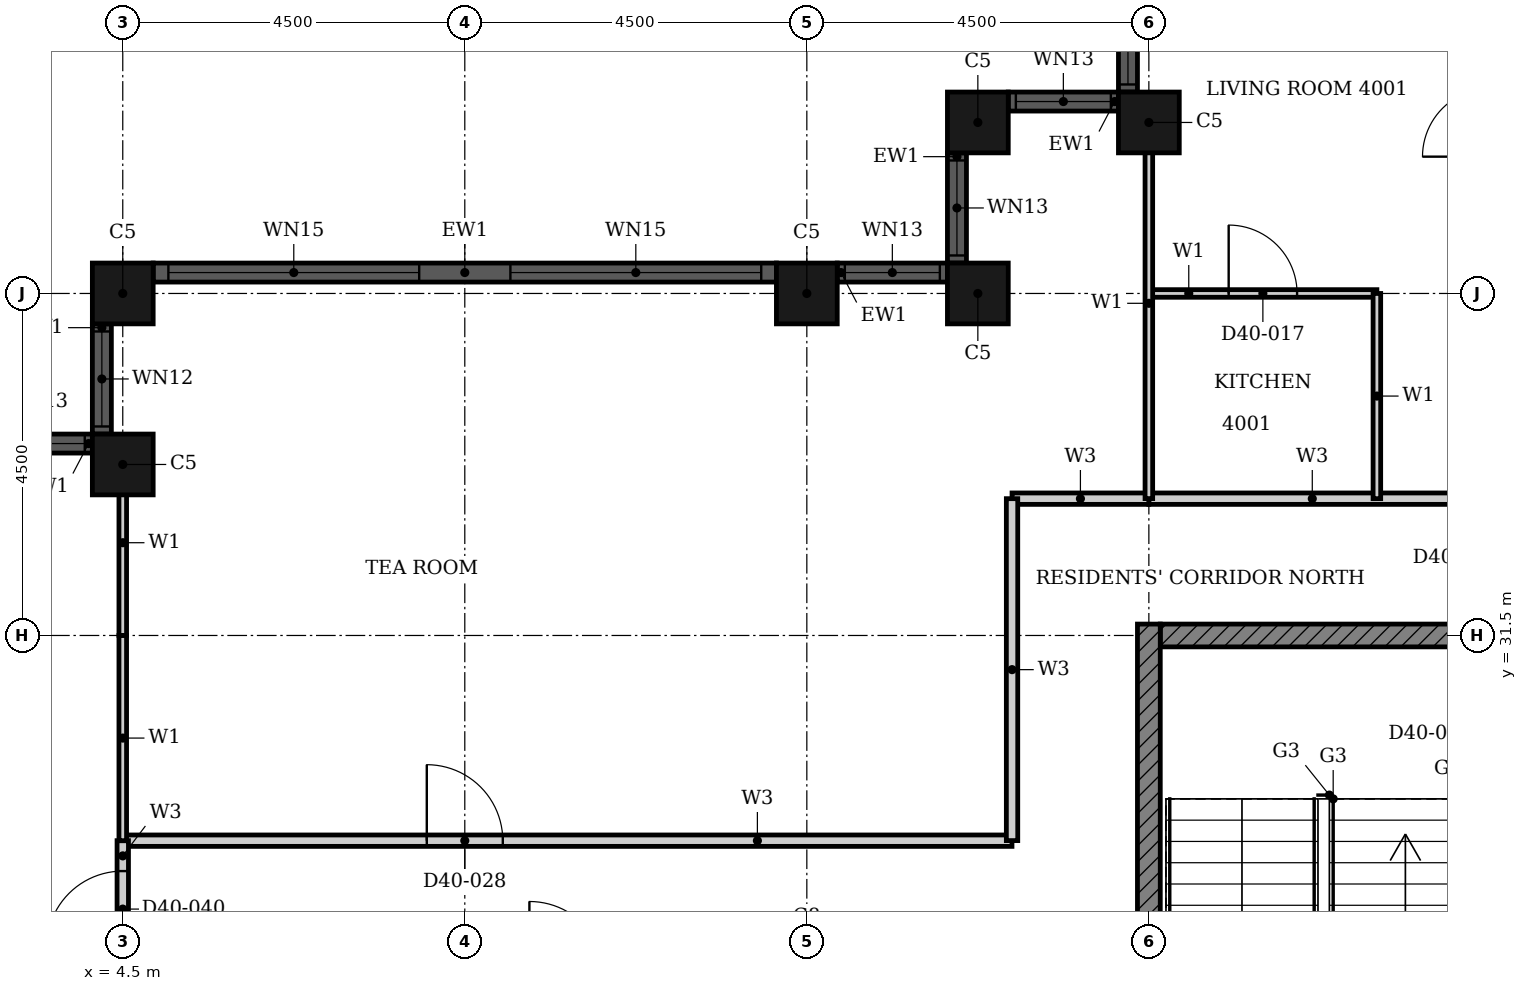
"""IFC4 building model, lengths in metres.
Left out: names, types, materials, properties, quantities, classifications, styles, units other than length and angle.
Written with IfcOpenShell. Run it as: python <this file> out.ifc"""

import sys

from ifc_helpers import new_model, si_unit, direction, frame, frame_2d, origin, origin_2d, place, context, subcontext, project, spatial, rectangle, hollow_rectangle, extrude, element, fill, save


model = new_model("IFC4")
c1 = context("Model", 3, precision=1e-05, world=origin(), true_north=direction((0.0, 1.0)))
c2 = subcontext(c1, "Body", "Model", "MODEL_VIEW")
j1 = project(units=[si_unit("LENGTHUNIT", "METRE"), si_unit("PLANEANGLEUNIT", "RADIAN")], contexts=[c1])
p1 = place(None, origin())
s1 = spatial("IfcSite", under=j1, at=p1, CompositionType="ELEMENT")
p2 = place(p1, origin())
s2 = spatial("IfcBuilding", under=s1, at=p2, CompositionType="ELEMENT")
p3 = place(p2, frame((0.0, 0.0, 161.7)))
s3 = spatial("IfcBuildingStorey", under=s2, at=p3, CompositionType="ELEMENT", Elevation=161.7)
for number, where, z_axis, x_axis in (
    (1, (18.0, 38.25, 0.0), (0.0, 0.0, 1.0), (1.0, 0.0, 0.0)),
    (2, (15.75, 38.25, 0.0), (0.0, 0.0, 1.0), (1.0, 0.0, 0.0)),
    (3, (15.75, 36.0, 0.0), (0.0, 0.0, 1.0), (1.0, 0.0, 0.0)),
    (4, (13.5, 36.0, 0.0), (0.0, 0.0, 1.0), (1.0, 0.0, 0.0)),
    (5, (4.5, 36.0, 0.0), (0.0, 0.0, 1.0), (1.0, 0.0, 0.0)),
    (6, (4.5, 33.75, 0.0), (0.0, 0.0, 1.0), (1.0, 0.0, 0.0)),
):
    element("IfcColumn", number, at=place(p3, frame(where, z_axis=z_axis, x_axis=x_axis)), inside=s3, PredefinedType="COLUMN", context=c2, shape_type="SweptSolid", body=[
        extrude(hollow_rectangle(XDim=0.8, YDim=0.8, WallThickness=0.025, at=origin_2d()), origin(), (0.0, 0.0, 1.0), 3.7),
    ])
p4 = place(p3, frame((17.725, 40.1, 0.0), z_axis=(0.0, 0.0, 1.0), x_axis=(0.0, -1.0, 0.0)))
e7 = element("IfcWall", 7, at=p4, inside=s3, PredefinedType="SOLIDWALL", context=c2, shape_type="SweptSolid", body=[
    extrude(rectangle(XDim=1.45, YDim=0.25, at=frame_2d((0.725, 0.0))), origin(), (0.0, 0.0, 1.0), 3.7),
])
p5 = place(p4, frame((0.1, 0.0, 0.9)))
e8 = element("IfcOpeningElement", 8, at=p5, cuts=e7, PredefinedType="OPENING", context=c2, shape_type="SweptSolid", body=[
    extrude(rectangle(XDim=1.25, YDim=1.85, at=frame_2d((0.625, 0.925))), frame((0.0, 0.135, 0.0), z_axis=(0.0, -1.0, 0.0), x_axis=(1.0, 0.0, 0.0)), (0.0, 0.0, 1.0), 0.27),
])
p6 = place(p3, frame((17.6, 38.525, 0.0), z_axis=(0.0, 0.0, 1.0), x_axis=(-1.0, 0.0, 0.0)))
e9 = element("IfcWall", 9, at=p6, inside=s3, PredefinedType="SOLIDWALL", context=c2, shape_type="SweptSolid", body=[
    extrude(rectangle(XDim=1.45, YDim=0.25, at=frame_2d((0.725, 0.0))), origin(), (0.0, 0.0, 1.0), 3.7),
])
p7 = place(p6, frame((0.1, 0.0, 0.9)))
e10 = element("IfcOpeningElement", 10, at=p7, cuts=e9, PredefinedType="OPENING", context=c2, shape_type="SweptSolid", body=[
    extrude(rectangle(XDim=1.25, YDim=1.85, at=frame_2d((0.625, 0.925))), frame((0.0, 0.135, 0.0), z_axis=(0.0, -1.0, 0.0), x_axis=(1.0, 0.0, 0.0)), (0.0, 0.0, 1.0), 0.27),
])
p8 = place(p3, frame((15.475, 37.85, 0.0), z_axis=(0.0, 0.0, 1.0), x_axis=(0.0, -1.0, 0.0)))
e11 = element("IfcWall", 11, at=p8, inside=s3, PredefinedType="SOLIDWALL", context=c2, shape_type="SweptSolid", body=[
    extrude(rectangle(XDim=1.45, YDim=0.25, at=frame_2d((0.725, 0.0))), origin(), (0.0, 0.0, 1.0), 3.7),
])
p9 = place(p8, frame((0.1, 0.0, 0.9)))
e12 = element("IfcOpeningElement", 12, at=p9, cuts=e11, PredefinedType="OPENING", context=c2, shape_type="SweptSolid", body=[
    extrude(rectangle(XDim=1.25, YDim=1.85, at=frame_2d((0.625, 0.925))), frame((0.0, 0.135, 0.0), z_axis=(0.0, -1.0, 0.0), x_axis=(1.0, 0.0, 0.0)), (0.0, 0.0, 1.0), 0.27),
])
p10 = place(p3, frame((15.35, 36.275, 0.0), z_axis=(0.0, 0.0, 1.0), x_axis=(-1.0, 0.0, 0.0)))
e13 = element("IfcWall", 13, at=p10, inside=s3, PredefinedType="SOLIDWALL", context=c2, shape_type="SweptSolid", body=[
    extrude(rectangle(XDim=1.45, YDim=0.25, at=frame_2d((0.725, 0.0))), origin(), (0.0, 0.0, 1.0), 3.7),
])
p11 = place(p10, frame((0.1, 0.0, 0.9)))
e14 = element("IfcOpeningElement", 14, at=p11, cuts=e13, PredefinedType="OPENING", context=c2, shape_type="SweptSolid", body=[
    extrude(rectangle(XDim=1.25, YDim=1.85, at=frame_2d((0.625, 0.925))), frame((0.0, 0.135, 0.0), z_axis=(0.0, -1.0, 0.0), x_axis=(1.0, 0.0, 0.0)), (0.0, 0.0, 1.0), 0.27),
])
p12 = place(p3, frame((13.1, 36.275, 0.0), z_axis=(0.0, 0.0, 1.0), x_axis=(-1.0, 0.0, 0.0)))
e15 = element("IfcWall", 15, at=p12, inside=s3, PredefinedType="SOLIDWALL", context=c2, shape_type="SweptSolid", body=[
    extrude(rectangle(XDim=8.2, YDim=0.25, at=frame_2d((4.1, 0.0))), origin(), (0.0, 0.0, 1.0), 3.7),
])
p13 = place(p12, frame((0.2, 0.0, 0.45)))
e16 = element("IfcOpeningElement", 16, at=p13, cuts=e15, PredefinedType="OPENING", context=c2, shape_type="SweptSolid", body=[
    extrude(rectangle(XDim=3.3, YDim=2.3, at=frame_2d((1.65, 1.15))), frame((0.0, 0.135, 0.0), z_axis=(0.0, -1.0, 0.0), x_axis=(1.0, 0.0, 0.0)), (0.0, 0.0, 1.0), 0.27),
])
p14 = place(p12, frame((4.7, 0.0, 0.45)))
e17 = element("IfcOpeningElement", 17, at=p14, cuts=e15, PredefinedType="OPENING", context=c2, shape_type="SweptSolid", body=[
    extrude(rectangle(XDim=3.3, YDim=2.3, at=frame_2d((1.65, 1.15))), frame((0.0, 0.135, 0.0), z_axis=(0.0, -1.0, 0.0), x_axis=(1.0, 0.0, 0.0)), (0.0, 0.0, 1.0), 0.27),
])
p15 = place(p3, frame((4.225, 35.6, 0.0), z_axis=(0.0, 0.0, 1.0), x_axis=(0.0, -1.0, 0.0)))
e18 = element("IfcWall", 18, at=p15, inside=s3, PredefinedType="SOLIDWALL", context=c2, shape_type="SweptSolid", body=[
    extrude(rectangle(XDim=1.45, YDim=0.25, at=frame_2d((0.725, 0.0))), origin(), (0.0, 0.0, 1.0), 3.7),
])
p16 = place(p15, frame((0.1, 0.0, 0.9)))
e19 = element("IfcOpeningElement", 19, at=p16, cuts=e18, PredefinedType="OPENING", context=c2, shape_type="SweptSolid", body=[
    extrude(rectangle(XDim=1.25, YDim=2.08, at=frame_2d((0.625, 1.04))), frame((0.0, 0.135, 0.0), z_axis=(0.0, -1.0, 0.0), x_axis=(1.0, 0.0, 0.0)), (0.0, 0.0, 1.0), 0.27),
])
p17 = place(p3, frame((4.1, 34.025, 0.0), z_axis=(0.0, 0.0, 1.0), x_axis=(-1.0, 0.0, 0.0)))
e20 = element("IfcWall", 20, at=p17, inside=s3, PredefinedType="SOLIDWALL", context=c2, shape_type="SweptSolid", body=[
    extrude(rectangle(XDim=1.45, YDim=0.25, at=frame_2d((0.725, 0.0))), origin(), (0.0, 0.0, 1.0), 3.7),
])
p18 = place(p17, frame((0.1, 0.0, 0.9)))
e21 = element("IfcOpeningElement", 21, at=p18, cuts=e20, PredefinedType="OPENING", context=c2, shape_type="SweptSolid", body=[
    extrude(rectangle(XDim=1.25, YDim=1.85, at=frame_2d((0.625, 0.925))), frame((0.0, 0.135, 0.0), z_axis=(0.0, -1.0, 0.0), x_axis=(1.0, 0.0, 0.0)), (0.0, 0.0, 1.0), 0.27),
])
p19 = place(p3, frame((18.15, 31.5, 0.0), z_axis=(0.0, 0.0, 1.0), x_axis=(1.0, 0.0, 0.0)))
e22 = element("IfcWall", 22, at=p19, inside=s3, PredefinedType="SHEAR", context=c2, shape_type="SweptSolid", body=[
    extrude(rectangle(XDim=9.368, YDim=0.3, at=frame_2d((4.684, 0.0))), origin(), (0.0, 0.0, 1.0), 3.4),
])
p20 = place(p19, frame((4.736, 0.0, 0.0)))
e23 = element("IfcOpeningElement", 23, at=p20, cuts=e22, PredefinedType="OPENING", context=c2, shape_type="SweptSolid", body=[
    extrude(rectangle(XDim=1.8, YDim=2.1, at=frame_2d((0.9, 1.05))), frame((0.0, 0.16, 0.0), z_axis=(0.0, -1.0, 0.0), x_axis=(1.0, 0.0, 0.0)), (0.0, 0.0, 1.0), 0.32),
])
p21 = place(p3, frame((18.0, 22.35, 0.0), z_axis=(0.0, 0.0, 1.0), x_axis=(0.0, 1.0, 0.0)))
e24 = element("IfcWall", 24, at=p21, inside=s3, PredefinedType="SHEAR", context=c2, shape_type="SweptSolid", body=[
    extrude(rectangle(XDim=9.3, YDim=0.3, at=frame_2d((4.65, 0.0))), origin(), (0.0, 0.0, 1.0), 3.4),
])
p22 = place(p3, frame((4.5, 28.8, 0.0), z_axis=(0.0, 0.0, 1.0), x_axis=(1.0, 0.0, 0.0)))
e25 = element("IfcWall", 25, at=p22, inside=s3, PredefinedType="PARTITIONING", context=c2, shape_type="SweptSolid", body=[
    extrude(rectangle(XDim=11.699, YDim=0.15, at=frame_2d((5.85, 0.0))), origin(), (0.0, 0.0, 1.0), 3.4),
])
p23 = place(p22, frame((4.0, 0.0, 0.0)))
e26 = element("IfcOpeningElement", 26, at=p23, cuts=e25, PredefinedType="OPENING", context=c2, shape_type="SweptSolid", body=[
    extrude(rectangle(XDim=1.0, YDim=2.1, at=frame_2d((0.5, 1.05))), frame((0.0, 0.085, 0.0), z_axis=(0.0, -1.0, 0.0), x_axis=(1.0, 0.0, 0.0)), (0.0, 0.0, 1.0), 0.17),
])
p24 = place(p3, frame((18.0, 33.3, 0.0), z_axis=(0.0, 0.0, 1.0), x_axis=(1.0, 0.0, 0.0)))
e27 = element("IfcWall", 27, at=p24, inside=s3, PredefinedType="PARTITIONING", context=c2, shape_type="SweptSolid", body=[
    extrude(rectangle(XDim=6.6, YDim=0.15, at=frame_2d((3.3, 0.0))), origin(), (0.0, 0.0, 1.0), 3.4),
])
p25 = place(p24, frame((4.3, 0.0, 0.0)))
e28 = element("IfcOpeningElement", 28, at=p25, cuts=e27, PredefinedType="OPENING", context=c2, shape_type="SweptSolid", body=[
    extrude(rectangle(XDim=1.0, YDim=2.2, at=frame_2d((0.5, 1.1))), frame((0.0, 0.085, 0.0), z_axis=(0.0, -1.0, 0.0), x_axis=(1.0, 0.0, 0.0)), (0.0, 0.0, 1.0), 0.17),
])
p26 = place(p3, frame((16.2, 33.3, 0.0), z_axis=(0.0, 0.0, 1.0), x_axis=(1.0, 0.0, 0.0)))
e29 = element("IfcWall", 29, at=p26, inside=s3, PredefinedType="PARTITIONING", context=c2, shape_type="SweptSolid", body=[
    extrude(rectangle(XDim=1.799, YDim=0.15, at=frame_2d((0.899, 0.0))), origin(), (0.0, 0.0, 1.0), 3.4),
])
p27 = place(p3, frame((16.2, 28.801, 0.0), z_axis=(0.0, 0.0, 1.0), x_axis=(0.0, 1.0, 0.0)))
e30 = element("IfcWall", 30, at=p27, inside=s3, PredefinedType="PARTITIONING", context=c2, shape_type="SweptSolid", body=[
    extrude(rectangle(XDim=4.499, YDim=0.15, at=frame_2d((2.25, 0.0))), origin(), (0.0, 0.0, 1.0), 3.4),
])
p28 = place(p3, frame((4.5, 27.0, 0.0), z_axis=(0.0, 0.0, 1.0), x_axis=(0.0, 1.0, 0.0)))
e31 = element("IfcWall", 31, at=p28, inside=s3, PredefinedType="PARTITIONING", context=c2, shape_type="SweptSolid", body=[
    extrude(rectangle(XDim=1.8, YDim=0.15, at=frame_2d((0.9, 0.0))), origin(), (0.0, 0.0, 1.0), 3.4),
])
p29 = place(p28, frame((0.4, 0.0, 0.0)))
e32 = element("IfcOpeningElement", 32, at=p29, cuts=e31, PredefinedType="OPENING", context=c2, shape_type="SweptSolid", body=[
    extrude(rectangle(XDim=1.0, YDim=2.2, at=frame_2d((0.5, 1.1))), frame((0.0, 0.085, 0.0), z_axis=(0.0, -1.0, 0.0), x_axis=(1.0, 0.0, 0.0)), (0.0, 0.0, 1.0), 0.17),
])
p30 = place(p3, frame((18.0, 36.0, 0.0), z_axis=(0.0, 0.0, 1.0), x_axis=(1.0, 0.0, 0.0)))
e33 = element("IfcWall", 33, at=p30, inside=s3, PredefinedType="PARTITIONING", context=c2, shape_type="SweptSolid", body=[
    extrude(rectangle(XDim=3.0, YDim=0.1, at=frame_2d((1.5, 0.0))), origin(), (0.0, 0.0, 1.0), 3.4),
])
p31 = place(p30, frame((1.05, 0.0, 0.0)))
e34 = element("IfcOpeningElement", 34, at=p31, cuts=e33, PredefinedType="OPENING", context=c2, shape_type="SweptSolid", body=[
    extrude(rectangle(XDim=0.9, YDim=2.1, at=frame_2d((0.45, 1.05))), frame((0.0, 0.06, 0.0), z_axis=(0.0, -1.0, 0.0), x_axis=(1.0, 0.0, 0.0)), (0.0, 0.0, 1.0), 0.12),
])
p32 = place(p3, frame((18.0, 33.301, 0.0), z_axis=(0.0, 0.0, 1.0), x_axis=(0.0, 1.0, 0.0)))
e35 = element("IfcWall", 35, at=p32, inside=s3, PredefinedType="PARTITIONING", context=c2, shape_type="SweptSolid", body=[
    extrude(rectangle(XDim=5.139, YDim=0.1, at=frame_2d((2.569, 0.0))), origin(), (0.0, 0.0, 1.0), 3.4),
])
for number, where, z_axis, x_axis in (
    (36, (21.0, 33.3, 0.0), (0.0, 0.0, 1.0), (0.0, 1.0, 0.0)),
    (37, (4.5, 28.8, 0.0), (0.0, 0.0, 1.0), (0.0, 1.0, 0.0)),
):
    element("IfcWall", number, at=place(p3, frame(where, z_axis=z_axis, x_axis=x_axis)), inside=s3, PredefinedType="PARTITIONING", context=c2, shape_type="SweptSolid", body=[
        extrude(rectangle(XDim=2.7, YDim=0.1, at=frame_2d((1.35, 0.0))), origin(), (0.0, 0.0, 1.0), 3.4),
    ])
p33 = place(p3, frame((4.5, 31.501, 0.0), z_axis=(0.0, 0.0, 1.0), x_axis=(0.0, 1.0, 0.0)))
e38 = element("IfcWall", 38, at=p33, inside=s3, PredefinedType="PARTITIONING", context=c2, shape_type="SweptSolid", body=[
    extrude(rectangle(XDim=2.439, YDim=0.1, at=frame_2d((1.219, 0.0))), origin(), (0.0, 0.0, 1.0), 3.4),
])
p34 = place(p5, origin())
e39 = element("IfcWindow", 39, at=p34, inside=s3, PartitioningType="SINGLE_PANEL", PredefinedType="WINDOW", context=c2, shape_type="SweptSolid", body=[
    extrude(rectangle(XDim=1.25, YDim=1.85, at=frame_2d((0.625, 0.925))), frame((0.0, 0.03, 0.0), z_axis=(0.0, -1.0, 0.0), x_axis=(1.0, 0.0, 0.0)), (0.0, 0.0, 1.0), 0.06),
])
fill(e8, e39)
p35 = place(p7, origin())
e40 = element("IfcWindow", 40, at=p35, inside=s3, PartitioningType="SINGLE_PANEL", PredefinedType="WINDOW", context=c2, shape_type="SweptSolid", body=[
    extrude(rectangle(XDim=1.25, YDim=1.85, at=frame_2d((0.625, 0.925))), frame((0.0, 0.03, 0.0), z_axis=(0.0, -1.0, 0.0), x_axis=(1.0, 0.0, 0.0)), (0.0, 0.0, 1.0), 0.06),
])
fill(e10, e40)
p36 = place(p9, origin())
e41 = element("IfcWindow", 41, at=p36, inside=s3, PartitioningType="SINGLE_PANEL", PredefinedType="WINDOW", context=c2, shape_type="SweptSolid", body=[
    extrude(rectangle(XDim=1.25, YDim=1.85, at=frame_2d((0.625, 0.925))), frame((0.0, 0.03, 0.0), z_axis=(0.0, -1.0, 0.0), x_axis=(1.0, 0.0, 0.0)), (0.0, 0.0, 1.0), 0.06),
])
fill(e12, e41)
p37 = place(p11, origin())
e42 = element("IfcWindow", 42, at=p37, inside=s3, PartitioningType="SINGLE_PANEL", PredefinedType="WINDOW", context=c2, shape_type="SweptSolid", body=[
    extrude(rectangle(XDim=1.25, YDim=1.85, at=frame_2d((0.625, 0.925))), frame((0.0, 0.03, 0.0), z_axis=(0.0, -1.0, 0.0), x_axis=(1.0, 0.0, 0.0)), (0.0, 0.0, 1.0), 0.06),
])
fill(e14, e42)
p38 = place(p13, origin())
e43 = element("IfcWindow", 43, at=p38, inside=s3, PartitioningType="SINGLE_PANEL", PredefinedType="WINDOW", context=c2, shape_type="SweptSolid", body=[
    extrude(rectangle(XDim=3.3, YDim=2.3, at=frame_2d((1.65, 1.15))), frame((0.0, 0.03, 0.0), z_axis=(0.0, -1.0, 0.0), x_axis=(1.0, 0.0, 0.0)), (0.0, 0.0, 1.0), 0.06),
])
fill(e16, e43)
p39 = place(p14, origin())
e44 = element("IfcWindow", 44, at=p39, inside=s3, PartitioningType="SINGLE_PANEL", PredefinedType="WINDOW", context=c2, shape_type="SweptSolid", body=[
    extrude(rectangle(XDim=3.3, YDim=2.3, at=frame_2d((1.65, 1.15))), frame((0.0, 0.03, 0.0), z_axis=(0.0, -1.0, 0.0), x_axis=(1.0, 0.0, 0.0)), (0.0, 0.0, 1.0), 0.06),
])
fill(e17, e44)
p40 = place(p16, origin())
e45 = element("IfcWindow", 45, at=p40, inside=s3, PartitioningType="SINGLE_PANEL", PredefinedType="WINDOW", context=c2, shape_type="SweptSolid", body=[
    extrude(rectangle(XDim=1.25, YDim=2.08, at=frame_2d((0.625, 1.04))), frame((0.0, 0.03, 0.0), z_axis=(0.0, -1.0, 0.0), x_axis=(1.0, 0.0, 0.0)), (0.0, 0.0, 1.0), 0.06),
])
fill(e19, e45)
p41 = place(p18, origin())
e46 = element("IfcWindow", 46, at=p41, inside=s3, PartitioningType="SINGLE_PANEL", PredefinedType="WINDOW", context=c2, shape_type="SweptSolid", body=[
    extrude(rectangle(XDim=1.25, YDim=1.85, at=frame_2d((0.625, 0.925))), frame((0.0, 0.03, 0.0), z_axis=(0.0, -1.0, 0.0), x_axis=(1.0, 0.0, 0.0)), (0.0, 0.0, 1.0), 0.06),
])
fill(e21, e46)
p42 = place(p31, origin())
e47 = element("IfcDoor", 47, at=p42, inside=s3, OperationType="SINGLE_SWING_LEFT", PredefinedType="DOOR", context=c2, shape_type="SweptSolid", body=[
    extrude(rectangle(XDim=0.9, YDim=2.1, at=frame_2d((0.45, 1.05))), frame((0.0, 0.025, 0.0), z_axis=(0.0, -1.0, 0.0), x_axis=(1.0, 0.0, 0.0)), (0.0, 0.0, 1.0), 0.05),
])
fill(e34, e47)
p43 = place(p23, origin())
e48 = element("IfcDoor", 48, at=p43, inside=s3, OperationType="SINGLE_SWING_RIGHT", PredefinedType="DOOR", context=c2, shape_type="SweptSolid", body=[
    extrude(rectangle(XDim=1.0, YDim=2.1, at=frame_2d((0.5, 1.05))), frame((0.0, 0.025, 0.0), z_axis=(0.0, -1.0, 0.0), x_axis=(1.0, 0.0, 0.0)), (0.0, 0.0, 1.0), 0.05),
])
fill(e26, e48)
p44 = place(p29, origin())
e49 = element("IfcDoor", 49, at=p44, inside=s3, OperationType="SINGLE_SWING_RIGHT", PredefinedType="DOOR", context=c2, shape_type="SweptSolid", body=[
    extrude(rectangle(XDim=1.0, YDim=2.2, at=frame_2d((0.5, 1.1))), frame((0.0, 0.025, 0.0), z_axis=(0.0, -1.0, 0.0), x_axis=(1.0, 0.0, 0.0)), (0.0, 0.0, 1.0), 0.05),
])
fill(e32, e49)
save(model, sys.argv[1])
